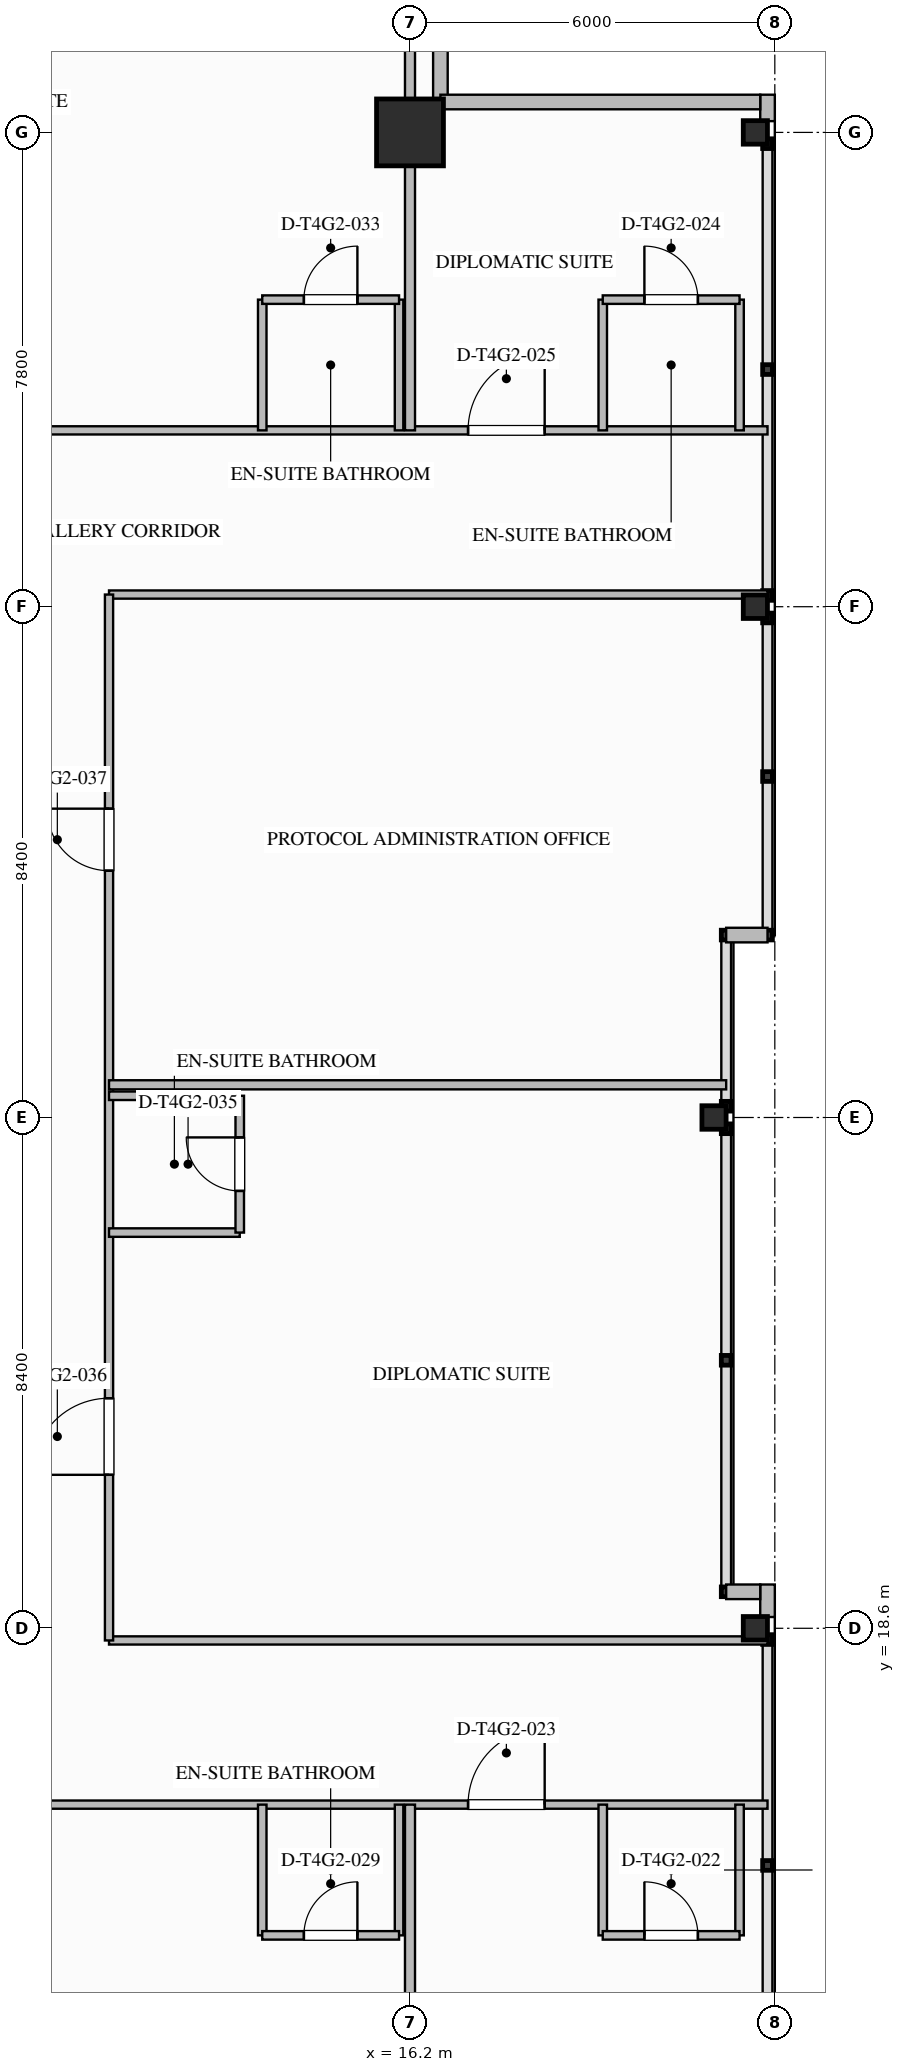
"""IFC4 building model, lengths in metres.
Left out: names, types, materials, properties, quantities, classifications, styles, units other than length and angle.
Written with IfcOpenShell. Run it as: python <this file> out.ifc"""

import sys

from ifc_helpers import new_model, si_unit, direction, frame, frame_2d, origin, origin_2d, place, context, subcontext, project, spatial, rectangle, i_section, extrude, element, fill, save


model = new_model("IFC4")
c1 = context("Model", 3, precision=1e-05, world=origin(), true_north=direction((0.0, 1.0)))
c2 = subcontext(c1, "Body", "Model", "MODEL_VIEW")
j1 = project(units=[si_unit("LENGTHUNIT", "METRE"), si_unit("PLANEANGLEUNIT", "RADIAN")], contexts=[c1])
p1 = place(None, origin())
s1 = spatial("IfcSite", under=j1, at=p1, CompositionType="ELEMENT")
p2 = place(p1, origin())
s2 = spatial("IfcBuilding", under=s1, at=p2, CompositionType="ELEMENT")
p3 = place(p2, frame((0.0, 0.0, 215.9)))
s3 = spatial("IfcBuildingStorey", under=s2, at=p3, CompositionType="ELEMENT", Elevation=215.9)
p4 = place(p3, frame((16.2, 43.2, 0.0), z_axis=(0.0, 0.0, 1.0), x_axis=(1.0, 0.0, 0.0)))
e1 = element("IfcColumn", 1, at=p4, inside=s3, PredefinedType="COLUMN", context=c2, shape_type="SweptSolid", body=[
    extrude(rectangle(XDim=1.1, YDim=1.1, at=origin_2d()), origin(), (0.0, 0.0, 1.0), 3.6),
])
for number, where, z_axis, x_axis in (
    (2, (21.88, 18.6, 0.0), (0.0, 0.0, 1.0), (1.0, 0.0, 0.0)),
    (3, (21.2, 27.0, 0.0), (0.0, 0.0, 1.0), (1.0, 0.0, 0.0)),
    (4, (21.88, 35.4, 0.0), (0.0, 0.0, 1.0), (1.0, 0.0, 0.0)),
    (5, (21.88, 43.2, 0.0), (0.0, 0.0, 1.0), (1.0, 0.0, 0.0)),
):
    element("IfcColumn", number, at=place(p3, frame(where, z_axis=z_axis, x_axis=x_axis)), inside=s3, PredefinedType="COLUMN", context=c2, shape_type="SweptSolid", body=[
        extrude(i_section(OverallWidth=0.397, OverallDepth=0.387, WebThickness=0.021, FlangeThickness=0.033, FilletRadius=0.025, at=origin_2d()), origin(), (0.0, 0.0, 1.0), 3.597),
    ])
p5 = place(p3, frame((22.08, 43.82, 0.0), z_axis=(0.0, 0.0, 1.0), x_axis=(0.0, -1.0, 0.0)))
e6 = element("IfcWall", 6, at=p5, inside=s3, PredefinedType="STANDARD", context=c2, shape_type="SweptSolid", body=[
    extrude(rectangle(XDim=0.435, YDim=0.24, at=frame_2d((0.217, 0.0))), origin(), (0.0, 0.0, 1.0), 3.34),
])
p6 = place(p3, frame((22.08, 19.32, 0.0), z_axis=(0.0, 0.0, 1.0), x_axis=(0.0, -1.0, 0.0)))
e7 = element("IfcWall", 7, at=p6, inside=s3, PredefinedType="STANDARD", context=c2, shape_type="SweptSolid", body=[
    extrude(rectangle(XDim=0.535, YDim=0.24, at=frame_2d((0.267, 0.0))), origin(), (0.0, 0.0, 1.0), 3.34),
])
for number, where, z_axis, x_axis in (
    (8, (16.7, 48.96, 0.0), (0.0, 0.0, 1.0), (0.0, -1.0, 0.0)),
    (9, (16.7, 43.7, 0.0), (0.0, 0.0, 1.0), (1.0, 0.0, 0.0)),
):
    element("IfcWall", number, at=place(p3, frame(where, z_axis=z_axis, x_axis=x_axis)), inside=s3, PredefinedType="STANDARD", context=c2, shape_type="SweptSolid", body=[
        extrude(rectangle(XDim=5.26, YDim=0.24, at=frame_2d((2.63, 0.0))), origin(), (0.0, 0.0, 1.0), 3.34),
    ])
p7 = place(p3, frame((22.08, 30.0, 0.0), z_axis=(0.0, 0.0, 1.0), x_axis=(-1.0, 0.0, 0.0)))
e10 = element("IfcWall", 10, at=p7, inside=s3, PredefinedType="STANDARD", context=c2, shape_type="SweptSolid", body=[
    extrude(rectangle(XDim=0.68, YDim=0.24, at=frame_2d((0.34, 0.0))), origin(), (0.0, 0.0, 1.0), 3.34),
])
p8 = place(p3, frame((21.4, 19.2, 0.0), z_axis=(0.0, 0.0, 1.0), x_axis=(1.0, 0.0, 0.0)))
e11 = element("IfcWall", 11, at=p8, inside=s3, PredefinedType="STANDARD", context=c2, shape_type="SweptSolid", body=[
    extrude(rectangle(XDim=0.56, YDim=0.24, at=frame_2d((0.28, 0.0))), origin(), (0.0, 0.0, 1.0), 3.34),
])
p9 = place(p3, frame((-16.2, 15.7, 0.0), z_axis=(0.0, 0.0, 1.0), x_axis=(1.0, 0.0, 0.0)))
e12 = element("IfcWall", 12, at=p9, inside=s3, PredefinedType="PARTITIONING", context=c2, shape_type="SweptSolid", body=[
    extrude(rectangle(XDim=38.28, YDim=0.135, at=frame_2d((19.14, 0.0))), origin(), (0.0, 0.0, 1.0), 3.34),
])
p10 = place(p9, frame((33.355, 0.0, 0.0)))
e13 = element("IfcOpeningElement", 13, at=p10, cuts=e12, PredefinedType="OPENING", context=c2, shape_type="SweptSolid", body=[
    extrude(rectangle(XDim=1.26, YDim=2.2, at=frame_2d((0.63, 1.1))), frame((0.0, 0.077, 0.0), z_axis=(0.0, -1.0, 0.0), x_axis=(1.0, 0.0, 0.0)), (0.0, 0.0, 1.0), 0.155),
])
p11 = place(p9, frame((4.183, 0.0, 0.0)))
e14 = element("IfcOpeningElement", 14, at=p11, cuts=e12, PredefinedType="OPENING", context=c2, shape_type="SweptSolid", body=[
    extrude(rectangle(XDim=1.26, YDim=2.2, at=frame_2d((0.63, 1.1))), frame((0.0, 0.077, 0.0), z_axis=(0.0, -1.0, 0.0), x_axis=(1.0, 0.0, 0.0)), (0.0, 0.0, 1.0), 0.155),
])
p12 = place(p9, frame((15.947, 0.0, 0.0)))
e15 = element("IfcOpeningElement", 15, at=p12, cuts=e12, PredefinedType="OPENING", context=c2, shape_type="SweptSolid", body=[
    extrude(rectangle(XDim=1.26, YDim=2.2, at=frame_2d((0.63, 1.1))), frame((0.0, 0.077, 0.0), z_axis=(0.0, -1.0, 0.0), x_axis=(1.0, 0.0, 0.0)), (0.0, 0.0, 1.0), 0.155),
])
p13 = place(p9, frame((24.904, 0.0, 0.0)))
e16 = element("IfcOpeningElement", 16, at=p13, cuts=e12, PredefinedType="OPENING", context=c2, shape_type="SweptSolid", body=[
    extrude(rectangle(XDim=1.26, YDim=2.2, at=frame_2d((0.63, 1.1))), frame((0.0, 0.077, 0.0), z_axis=(0.0, -1.0, 0.0), x_axis=(1.0, 0.0, 0.0)), (0.0, 0.0, 1.0), 0.155),
])
p14 = place(p3, frame((-16.2, 38.3, 0.0), z_axis=(0.0, 0.0, 1.0), x_axis=(1.0, 0.0, 0.0)))
e17 = element("IfcWall", 17, at=p14, inside=s3, PredefinedType="PARTITIONING", context=c2, shape_type="SweptSolid", body=[
    extrude(rectangle(XDim=38.28, YDim=0.135, at=frame_2d((19.14, 0.0))), origin(), (0.0, 0.0, 1.0), 3.34),
])
p15 = place(p14, frame((33.355, 0.0, 0.0)))
e18 = element("IfcOpeningElement", 18, at=p15, cuts=e17, PredefinedType="OPENING", context=c2, shape_type="SweptSolid", body=[
    extrude(rectangle(XDim=1.26, YDim=2.2, at=frame_2d((0.63, 1.1))), frame((0.0, 0.077, 0.0), z_axis=(0.0, -1.0, 0.0), x_axis=(1.0, 0.0, 0.0)), (0.0, 0.0, 1.0), 0.155),
])
p16 = place(p14, frame((7.268, 0.0, 0.0)))
e19 = element("IfcOpeningElement", 19, at=p16, cuts=e17, PredefinedType="OPENING", context=c2, shape_type="SweptSolid", body=[
    extrude(rectangle(XDim=1.26, YDim=2.2, at=frame_2d((0.63, 1.1))), frame((0.0, 0.077, 0.0), z_axis=(0.0, -1.0, 0.0), x_axis=(1.0, 0.0, 0.0)), (0.0, 0.0, 1.0), 0.155),
])
p17 = place(p14, frame((23.468, 0.0, 0.0)))
e20 = element("IfcOpeningElement", 20, at=p17, cuts=e17, PredefinedType="OPENING", context=c2, shape_type="SweptSolid", body=[
    extrude(rectangle(XDim=1.26, YDim=2.2, at=frame_2d((0.63, 1.1))), frame((0.0, 0.077, 0.0), z_axis=(0.0, -1.0, 0.0), x_axis=(1.0, 0.0, 0.0)), (0.0, 0.0, 1.0), 0.155),
])
for number, where, z_axis, x_axis in (
    (21, (11.25, 18.4, 0.0), (0.0, 0.0, 1.0), (1.0, 0.0, 0.0)),
    (22, (11.25, 35.6, 0.0), (0.0, 0.0, 1.0), (1.0, 0.0, 0.0)),
):
    element("IfcWall", number, at=place(p3, frame(where, z_axis=z_axis, x_axis=x_axis)), inside=s3, PredefinedType="PARTITIONING", context=c2, shape_type="SweptSolid", body=[
        extrude(rectangle(XDim=10.83, YDim=0.135, at=frame_2d((5.415, 0.0))), origin(), (0.0, 0.0, 1.0), 2.718),
    ])
p18 = place(p3, frame((11.25, 18.4, 0.0), z_axis=(0.0, 0.0, 1.0), x_axis=(0.0, 1.0, 0.0)))
e23 = element("IfcWall", 23, at=p18, inside=s3, PredefinedType="PARTITIONING", context=c2, shape_type="SweptSolid", body=[
    extrude(rectangle(XDim=17.2, YDim=0.135, at=frame_2d((8.6, 0.0))), origin(), (0.0, 0.0, 1.0), 3.34),
])
p19 = place(p18, frame((2.724, 0.0, 0.0)))
e24 = element("IfcOpeningElement", 24, at=p19, cuts=e23, PredefinedType="OPENING", context=c2, shape_type="SweptSolid", body=[
    extrude(rectangle(XDim=1.26, YDim=2.2, at=frame_2d((0.63, 1.1))), frame((0.0, 0.077, 0.0), z_axis=(0.0, -1.0, 0.0), x_axis=(1.0, 0.0, 0.0)), (0.0, 0.0, 1.0), 0.155),
])
p20 = place(p18, frame((12.659, 0.0, 0.0)))
e25 = element("IfcOpeningElement", 25, at=p20, cuts=e23, PredefinedType="OPENING", context=c2, shape_type="SweptSolid", body=[
    extrude(rectangle(XDim=1.02, YDim=2.15, at=frame_2d((0.51, 1.075))), frame((0.0, 0.077, 0.0), z_axis=(0.0, -1.0, 0.0), x_axis=(1.0, 0.0, 0.0)), (0.0, 0.0, 1.0), 0.155),
])
p21 = place(p3, frame((16.2, 0.12, 0.0), z_axis=(0.0, 0.0, 1.0), x_axis=(0.0, 1.0, 0.0)))
e26 = element("IfcWall", 26, at=p21, inside=s3, PredefinedType="PARTITIONING", context=c2, shape_type="SweptSolid", body=[
    extrude(rectangle(XDim=15.58, YDim=0.165, at=frame_2d((7.79, 0.0))), origin(), (0.0, 0.0, 1.0), 2.714),
])
p22 = place(p3, frame((16.2, 38.3, 0.0), z_axis=(0.0, 0.0, 1.0), x_axis=(0.0, 1.0, 0.0)))
e27 = element("IfcWall", 27, at=p22, inside=s3, PredefinedType="PARTITIONING", context=c2, shape_type="SweptSolid", body=[
    extrude(rectangle(XDim=10.78, YDim=0.165, at=frame_2d((5.39, 0.0))), origin(), (0.0, 0.0, 1.0), 2.714),
])
for number, where, z_axis, x_axis in (
    (28, (19.37, 15.7, 0.0), (0.0, 0.0, 1.0), (0.0, -1.0, 0.0)),
    (29, (21.62, 15.7, 0.0), (0.0, 0.0, 1.0), (0.0, -1.0, 0.0)),
):
    element("IfcWall", number, at=place(p3, frame(where, z_axis=z_axis, x_axis=x_axis)), inside=s3, PredefinedType="PLUMBINGWALL", context=c2, shape_type="SweptSolid", body=[
        extrude(rectangle(XDim=2.15, YDim=0.14, at=frame_2d((1.075, 0.0))), origin(), (0.0, 0.0, 1.0), 3.34),
    ])
p23 = place(p3, frame((19.37, 13.55, 0.0), z_axis=(0.0, 0.0, 1.0), x_axis=(1.0, 0.0, 0.0)))
e30 = element("IfcWall", 30, at=p23, inside=s3, PredefinedType="PLUMBINGWALL", context=c2, shape_type="SweptSolid", body=[
    extrude(rectangle(XDim=2.25, YDim=0.14, at=frame_2d((1.125, 0.0))), origin(), (0.0, 0.0, 1.0), 3.34),
])
p24 = place(p23, frame((0.685, 0.0, 0.0)))
e31 = element("IfcOpeningElement", 31, at=p24, cuts=e30, PredefinedType="OPENING", context=c2, shape_type="SweptSolid", body=[
    extrude(rectangle(XDim=0.88, YDim=2.1, at=frame_2d((0.44, 1.05))), frame((0.0, 0.08, 0.0), z_axis=(0.0, -1.0, 0.0), x_axis=(1.0, 0.0, 0.0)), (0.0, 0.0, 1.0), 0.16),
])
for number, where, z_axis, x_axis in (
    (32, (19.37, 38.3, 0.0), (0.0, 0.0, 1.0), (0.0, 1.0, 0.0)),
    (33, (21.62, 38.3, 0.0), (0.0, 0.0, 1.0), (0.0, 1.0, 0.0)),
):
    element("IfcWall", number, at=place(p3, frame(where, z_axis=z_axis, x_axis=x_axis)), inside=s3, PredefinedType="PLUMBINGWALL", context=c2, shape_type="SweptSolid", body=[
        extrude(rectangle(XDim=2.15, YDim=0.14, at=frame_2d((1.075, 0.0))), origin(), (0.0, 0.0, 1.0), 3.34),
    ])
p25 = place(p3, frame((19.37, 40.45, 0.0), z_axis=(0.0, 0.0, 1.0), x_axis=(1.0, 0.0, 0.0)))
e34 = element("IfcWall", 34, at=p25, inside=s3, PredefinedType="PLUMBINGWALL", context=c2, shape_type="SweptSolid", body=[
    extrude(rectangle(XDim=2.25, YDim=0.14, at=frame_2d((1.125, 0.0))), origin(), (0.0, 0.0, 1.0), 3.34),
])
p26 = place(p25, frame((0.685, 0.0, 0.0)))
e35 = element("IfcOpeningElement", 35, at=p26, cuts=e34, PredefinedType="OPENING", context=c2, shape_type="SweptSolid", body=[
    extrude(rectangle(XDim=0.88, YDim=2.1, at=frame_2d((0.44, 1.05))), frame((0.0, 0.08, 0.0), z_axis=(0.0, -1.0, 0.0), x_axis=(1.0, 0.0, 0.0)), (0.0, 0.0, 1.0), 0.16),
])
p27 = place(p3, frame((13.77, 15.7, 0.0), z_axis=(0.0, 0.0, 1.0), x_axis=(0.0, -1.0, 0.0)))
e36 = element("IfcWall", 36, at=p27, inside=s3, PredefinedType="PLUMBINGWALL", context=c2, shape_type="SweptSolid", body=[
    extrude(rectangle(XDim=2.15, YDim=0.14, at=frame_2d((1.075, 0.0))), origin(), (0.0, 0.0, 1.0), 3.34),
])
p28 = place(p3, frame((16.02, 15.7, 0.0), z_axis=(0.0, 0.0, 1.0), x_axis=(0.0, -1.0, 0.0)))
e37 = element("IfcWall", 37, at=p28, inside=s3, PredefinedType="PLUMBINGWALL", context=c2, shape_type="SweptSolid", body=[
    extrude(rectangle(XDim=2.15, YDim=0.14, at=frame_2d((1.075, 0.0))), origin(), (0.0, 0.0, 1.0), 2.714),
])
p29 = place(p3, frame((13.77, 13.55, 0.0), z_axis=(0.0, 0.0, 1.0), x_axis=(1.0, 0.0, 0.0)))
e38 = element("IfcWall", 38, at=p29, inside=s3, PredefinedType="PLUMBINGWALL", context=c2, shape_type="SweptSolid", body=[
    extrude(rectangle(XDim=2.25, YDim=0.14, at=frame_2d((1.125, 0.0))), origin(), (0.0, 0.0, 1.0), 3.34),
])
p30 = place(p29, frame((0.685, 0.0, 0.0)))
e39 = element("IfcOpeningElement", 39, at=p30, cuts=e38, PredefinedType="OPENING", context=c2, shape_type="SweptSolid", body=[
    extrude(rectangle(XDim=0.88, YDim=2.1, at=frame_2d((0.44, 1.05))), frame((0.0, 0.08, 0.0), z_axis=(0.0, -1.0, 0.0), x_axis=(1.0, 0.0, 0.0)), (0.0, 0.0, 1.0), 0.16),
])
p31 = place(p3, frame((13.77, 38.3, 0.0), z_axis=(0.0, 0.0, 1.0), x_axis=(0.0, 1.0, 0.0)))
e40 = element("IfcWall", 40, at=p31, inside=s3, PredefinedType="PLUMBINGWALL", context=c2, shape_type="SweptSolid", body=[
    extrude(rectangle(XDim=2.15, YDim=0.14, at=frame_2d((1.075, 0.0))), origin(), (0.0, 0.0, 1.0), 3.34),
])
p32 = place(p3, frame((16.02, 38.3, 0.0), z_axis=(0.0, 0.0, 1.0), x_axis=(0.0, 1.0, 0.0)))
e41 = element("IfcWall", 41, at=p32, inside=s3, PredefinedType="PLUMBINGWALL", context=c2, shape_type="SweptSolid", body=[
    extrude(rectangle(XDim=2.15, YDim=0.14, at=frame_2d((1.075, 0.0))), origin(), (0.0, 0.0, 1.0), 2.714),
])
p33 = place(p3, frame((13.77, 40.45, 0.0), z_axis=(0.0, 0.0, 1.0), x_axis=(1.0, 0.0, 0.0)))
e42 = element("IfcWall", 42, at=p33, inside=s3, PredefinedType="PLUMBINGWALL", context=c2, shape_type="SweptSolid", body=[
    extrude(rectangle(XDim=2.25, YDim=0.14, at=frame_2d((1.125, 0.0))), origin(), (0.0, 0.0, 1.0), 3.34),
])
p34 = place(p33, frame((0.685, 0.0, 0.0)))
e43 = element("IfcOpeningElement", 43, at=p34, cuts=e42, PredefinedType="OPENING", context=c2, shape_type="SweptSolid", body=[
    extrude(rectangle(XDim=0.88, YDim=2.1, at=frame_2d((0.44, 1.05))), frame((0.0, 0.08, 0.0), z_axis=(0.0, -1.0, 0.0), x_axis=(1.0, 0.0, 0.0)), (0.0, 0.0, 1.0), 0.16),
])
for number, where, z_axis, x_axis in (
    (44, (11.25, 25.107, 0.0), (0.0, 0.0, 1.0), (1.0, 0.0, 0.0)),
    (45, (11.25, 27.357, 0.0), (0.0, 0.0, 1.0), (1.0, 0.0, 0.0)),
):
    element("IfcWall", number, at=place(p3, frame(where, z_axis=z_axis, x_axis=x_axis)), inside=s3, PredefinedType="PLUMBINGWALL", context=c2, shape_type="SweptSolid", body=[
        extrude(rectangle(XDim=2.15, YDim=0.14, at=frame_2d((1.075, 0.0))), origin(), (0.0, 0.0, 1.0), 3.34),
    ])
p35 = place(p3, frame((13.4, 25.107, 0.0), z_axis=(0.0, 0.0, 1.0), x_axis=(0.0, 1.0, 0.0)))
e46 = element("IfcWall", 46, at=p35, inside=s3, PredefinedType="PLUMBINGWALL", context=c2, shape_type="SweptSolid", body=[
    extrude(rectangle(XDim=2.25, YDim=0.14, at=frame_2d((1.125, 0.0))), origin(), (0.0, 0.0, 1.0), 3.34),
])
p36 = place(p35, frame((0.685, 0.0, 0.0)))
e47 = element("IfcOpeningElement", 47, at=p36, cuts=e46, PredefinedType="OPENING", context=c2, shape_type="SweptSolid", body=[
    extrude(rectangle(XDim=0.88, YDim=2.1, at=frame_2d((0.44, 1.05))), frame((0.0, 0.08, 0.0), z_axis=(0.0, -1.0, 0.0), x_axis=(1.0, 0.0, 0.0)), (0.0, 0.0, 1.0), 0.16),
])
p37 = place(p3, frame((11.25, 27.538, 0.0), z_axis=(0.0, 0.0, 1.0), x_axis=(1.0, 0.0, 0.0)))
e48 = element("IfcWall", 48, at=p37, inside=s3, PredefinedType="PARTITIONING", context=c2, shape_type="SweptSolid", body=[
    extrude(rectangle(XDim=10.15, YDim=0.15, at=frame_2d((5.075, 0.0))), origin(), (0.0, 0.0, 1.0), 3.34),
])
p38 = place(p24, origin())
e49 = element("IfcDoor", 49, at=p38, inside=s3, OperationType="SINGLE_SWING_LEFT", PredefinedType="DOOR", context=c2, shape_type="SweptSolid", body=[
    extrude(rectangle(XDim=0.88, YDim=2.1, at=frame_2d((0.44, 1.05))), frame((0.0, 0.025, 0.0), z_axis=(0.0, -1.0, 0.0), x_axis=(1.0, 0.0, 0.0)), (0.0, 0.0, 1.0), 0.05),
])
fill(e31, e49)
p39 = place(p10, origin())
e50 = element("IfcDoor", 50, at=p39, inside=s3, OperationType="SINGLE_SWING_RIGHT", PredefinedType="DOOR", context=c2, shape_type="SweptSolid", body=[
    extrude(rectangle(XDim=1.26, YDim=2.2, at=frame_2d((0.63, 1.1))), frame((0.0, 0.025, 0.0), z_axis=(0.0, -1.0, 0.0), x_axis=(1.0, 0.0, 0.0)), (0.0, 0.0, 1.0), 0.05),
])
fill(e13, e50)
p40 = place(p26, origin())
e51 = element("IfcDoor", 51, at=p40, inside=s3, OperationType="SINGLE_SWING_LEFT", PredefinedType="DOOR", context=c2, shape_type="SweptSolid", body=[
    extrude(rectangle(XDim=0.88, YDim=2.1, at=frame_2d((0.44, 1.05))), frame((0.0, 0.025, 0.0), z_axis=(0.0, -1.0, 0.0), x_axis=(1.0, 0.0, 0.0)), (0.0, 0.0, 1.0), 0.05),
])
fill(e35, e51)
p41 = place(p15, origin())
e52 = element("IfcDoor", 52, at=p41, inside=s3, OperationType="SINGLE_SWING_RIGHT", PredefinedType="DOOR", context=c2, shape_type="SweptSolid", body=[
    extrude(rectangle(XDim=1.26, YDim=2.2, at=frame_2d((0.63, 1.1))), frame((0.0, 0.025, 0.0), z_axis=(0.0, -1.0, 0.0), x_axis=(1.0, 0.0, 0.0)), (0.0, 0.0, 1.0), 0.05),
])
fill(e18, e52)
p42 = place(p30, origin())
e53 = element("IfcDoor", 53, at=p42, inside=s3, OperationType="SINGLE_SWING_RIGHT", PredefinedType="DOOR", context=c2, shape_type="SweptSolid", body=[
    extrude(rectangle(XDim=0.88, YDim=2.1, at=frame_2d((0.44, 1.05))), frame((0.0, 0.025, 0.0), z_axis=(0.0, -1.0, 0.0), x_axis=(1.0, 0.0, 0.0)), (0.0, 0.0, 1.0), 0.05),
])
fill(e39, e53)
p43 = place(p34, origin())
e54 = element("IfcDoor", 54, at=p43, inside=s3, OperationType="SINGLE_SWING_RIGHT", PredefinedType="DOOR", context=c2, shape_type="SweptSolid", body=[
    extrude(rectangle(XDim=0.88, YDim=2.1, at=frame_2d((0.44, 1.05))), frame((0.0, 0.025, 0.0), z_axis=(0.0, -1.0, 0.0), x_axis=(1.0, 0.0, 0.0)), (0.0, 0.0, 1.0), 0.05),
])
fill(e43, e54)
p44 = place(p36, origin())
e55 = element("IfcDoor", 55, at=p44, inside=s3, OperationType="SINGLE_SWING_RIGHT", PredefinedType="DOOR", context=c2, shape_type="SweptSolid", body=[
    extrude(rectangle(XDim=0.88, YDim=2.1, at=frame_2d((0.44, 1.05))), frame((0.0, 0.025, 0.0), z_axis=(0.0, -1.0, 0.0), x_axis=(1.0, 0.0, 0.0)), (0.0, 0.0, 1.0), 0.05),
])
fill(e47, e55)
p45 = place(p19, origin())
e56 = element("IfcDoor", 56, at=p45, inside=s3, OperationType="SINGLE_SWING_LEFT", PredefinedType="DOOR", context=c2, shape_type="SweptSolid", body=[
    extrude(rectangle(XDim=1.26, YDim=2.2, at=frame_2d((0.63, 1.1))), frame((0.0, 0.025, 0.0), z_axis=(0.0, -1.0, 0.0), x_axis=(1.0, 0.0, 0.0)), (0.0, 0.0, 1.0), 0.05),
])
fill(e24, e56)
p46 = place(p20, origin())
e57 = element("IfcDoor", 57, at=p46, inside=s3, OperationType="SINGLE_SWING_RIGHT", PredefinedType="DOOR", context=c2, shape_type="SweptSolid", body=[
    extrude(rectangle(XDim=1.02, YDim=2.15, at=frame_2d((0.51, 1.075))), frame((0.0, 0.025, 0.0), z_axis=(0.0, -1.0, 0.0), x_axis=(1.0, 0.0, 0.0)), (0.0, 0.0, 1.0), 0.05),
])
fill(e25, e57)
save(model, sys.argv[1])
